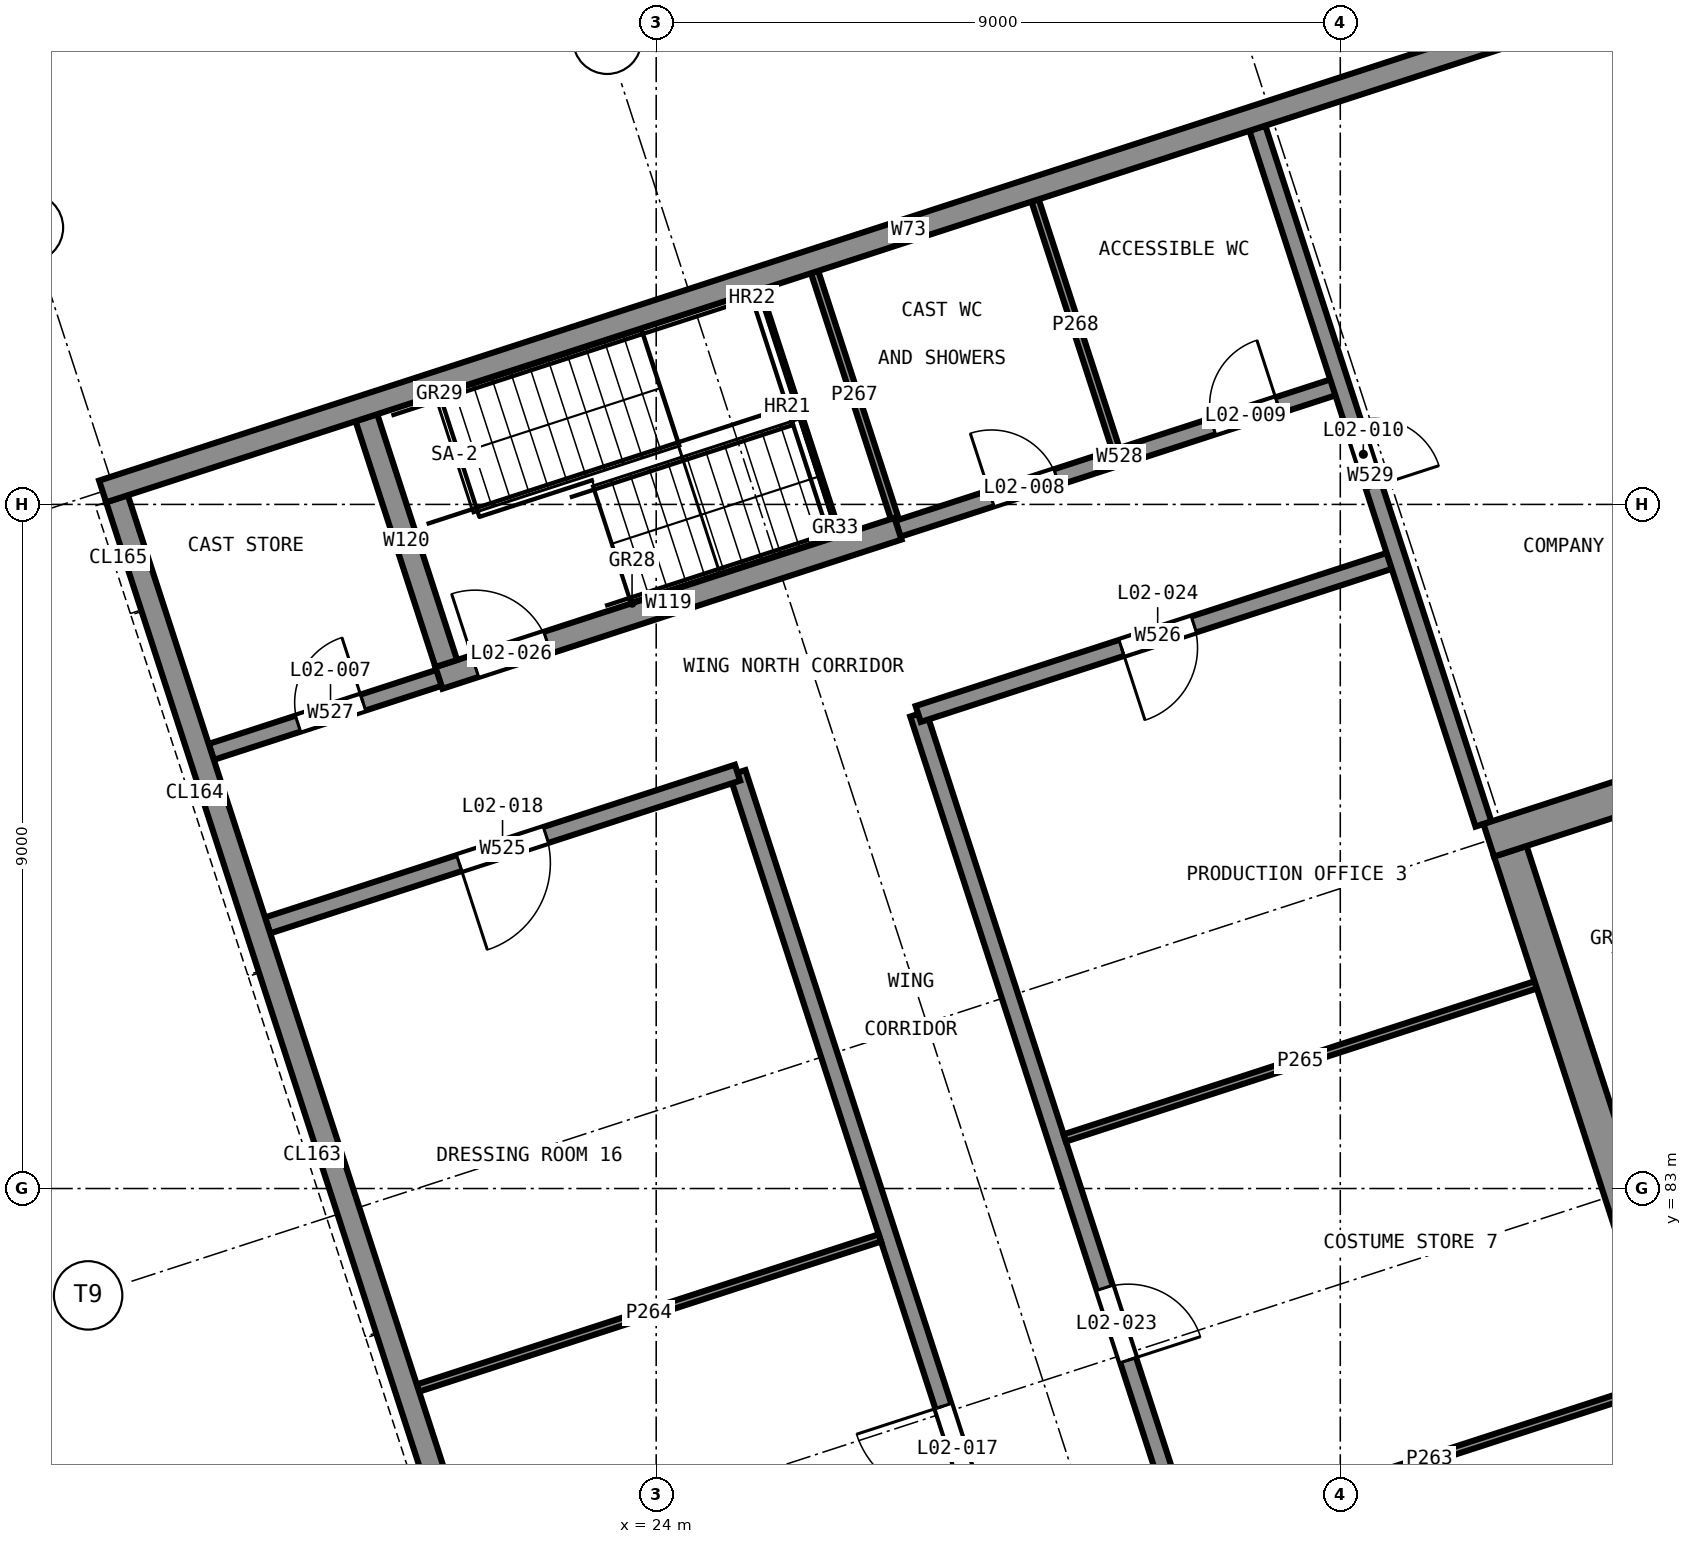
"""IFC4 building model, lengths in metres.
Left out: names, types, materials, properties, quantities, classifications, styles, units other than length and angle.
Written with IfcOpenShell. Run it as: python <this file> out.ifc"""

import sys

from ifc_helpers import new_model, si_unit, direction, frame, frame_2d, origin, place, context, subcontext, project, spatial, rectangle, extrude, element, fill, save


model = new_model("IFC4")
c1 = context("Model", 3, precision=1e-05, world=origin(), true_north=direction((0.0, 1.0)))
c2 = subcontext(c1, "Body", "Model", "MODEL_VIEW")
j1 = project(units=[si_unit("LENGTHUNIT", "METRE"), si_unit("PLANEANGLEUNIT", "RADIAN")], contexts=[c1])
p1 = place(None, origin())
s1 = spatial("IfcSite", under=j1, at=p1, CompositionType="ELEMENT")
p2 = place(p1, origin())
s2 = spatial("IfcBuilding", under=s1, at=p2, CompositionType="ELEMENT")
p3 = place(p2, frame((0.0, 0.0, 9.5)))
s3 = spatial("IfcBuildingStorey", under=s2, at=p3, CompositionType="ELEMENT", Elevation=9.5)
p4 = place(p3, frame((41.286, 68.82, 0.0), z_axis=(0.0, 0.0, 1.0), x_axis=(-0.309008517326, 0.951059270613, 0.0)))
e1 = element("IfcWall", 1, at=p4, inside=s3, PredefinedType="SHEAR", context=c2, shape_type="SweptSolid", body=[
    extrude(rectangle(XDim=19.575, YDim=0.45, at=frame_2d((9.788, 0.0))), origin(), (0.0, 0.0, 1.0), 4.0),
])
p5 = place(p3, frame((34.953, 87.581, 0.0), z_axis=(0.0, 0.0, 1.0), x_axis=(0.951059165148, 0.309008841924, 0.0)))
e2 = element("IfcWall", 2, at=p5, inside=s3, PredefinedType="SHEAR", context=c2, shape_type="SweptSolid", body=[
    extrude(rectangle(XDim=29.45, YDim=0.45, at=frame_2d((14.725, 0.0))), origin(), (0.0, 0.0, 1.0), 4.0),
])
p6 = place(p3, frame((33.501, 41.003, 0.0), z_axis=(0.0, 0.0, 1.0), x_axis=(-0.309017194826, 0.951056451165, 0.0)))
e3 = element("IfcWall", 3, at=p6, inside=s3, PredefinedType="SOLIDWALL", context=c2, shape_type="SweptSolid", body=[
    extrude(rectangle(XDim=53.7, YDim=0.3, at=frame_2d((26.85, 0.0))), origin(), (0.0, 0.0, 1.0), 4.0),
])
p7 = place(p6, frame((21.55, 0.0, 0.9)))
e4 = element("IfcOpeningElement", 4, at=p7, cuts=e3, PredefinedType="OPENING", context=c2, shape_type="SweptSolid", body=[
    extrude(rectangle(XDim=3.6, YDim=2.1, at=frame_2d((1.8, 1.05))), frame((0.0, 0.16, 0.0), z_axis=(0.0, -1.0, 0.0), x_axis=(1.0, 0.0, 0.0)), (0.0, 0.0, 1.0), 0.32),
])
p8 = place(p3, frame((16.718, 92.171, 0.0), z_axis=(0.0, 0.0, 1.0), x_axis=(0.951055789165, 0.309019232243, 0.0)))
e5 = element("IfcWall", 5, at=p8, inside=s3, PredefinedType="SOLIDWALL", context=c2, shape_type="SweptSolid", body=[
    extrude(rectangle(XDim=22.3, YDim=0.3, at=frame_2d((11.15, 0.0))), origin(), (0.0, 0.0, 1.0), 4.0),
])
p9 = place(p3, frame((27.181, 91.68, 0.0), z_axis=(0.0, 0.0, 1.0), x_axis=(-0.951051301895, -0.309033042189, 0.0)))
e6 = element("IfcWall", 6, at=p9, inside=s3, PredefinedType="SOLIDWALL", context=c2, shape_type="SweptSolid", body=[
    extrude(rectangle(XDim=6.35, YDim=0.3, at=frame_2d((3.175, 0.0))), origin(), (0.0, 0.0, 1.0), 3.7),
])
p10 = place(p9, frame((4.85, 0.0, 0.0)))
e7 = element("IfcOpeningElement", 7, at=p10, cuts=e6, PredefinedType="OPENING", context=c2, shape_type="SweptSolid", body=[
    extrude(rectangle(XDim=1.0, YDim=2.1, at=frame_2d((0.5, 1.05))), frame((0.0, 0.16, 0.0), z_axis=(0.0, -1.0, 0.0), x_axis=(1.0, 0.0, 0.0)), (0.0, 0.0, 1.0), 0.32),
])
p11 = place(p3, frame((21.238, 89.907, 0.0), z_axis=(0.0, 0.0, 1.0), x_axis=(-0.309066587596, 0.951040401051, 0.0)))
e8 = element("IfcWall", 8, at=p11, inside=s3, PredefinedType="SOLIDWALL", context=c2, shape_type="SweptSolid", body=[
    extrude(rectangle(XDim=3.4, YDim=0.3, at=frame_2d((1.7, 0.0))), origin(), (0.0, 0.0, 1.0), 3.7),
])
p12 = place(p3, frame((37.956, 48.812, 0.0), z_axis=(0.0, 0.0, 1.0), x_axis=(-0.30901736393, 0.951056396219, 0.0)))
e9 = element("IfcWall", 9, at=p12, inside=s3, PredefinedType="SOLIDWALL", context=c2, shape_type="SweptSolid", body=[
    extrude(rectangle(XDim=41.7, YDim=0.22, at=frame_2d((20.85, 0.0))), origin(), (0.0, 0.0, 1.0), 3.7),
])
p13 = place(p12, frame((2.009, 0.0, 0.0)))
e10 = element("IfcOpeningElement", 10, at=p13, cuts=e9, PredefinedType="OPENING", context=c2, shape_type="SweptSolid", body=[
    extrude(rectangle(XDim=1.0, YDim=2.1, at=frame_2d((0.5, 1.05))), frame((0.0, 0.12, 0.0), z_axis=(0.0, -1.0, 0.0), x_axis=(1.0, 0.0, 0.0)), (0.0, 0.0, 1.0), 0.24),
])
p14 = place(p12, frame((6.6, 0.0, 0.0)))
e11 = element("IfcOpeningElement", 11, at=p14, cuts=e9, PredefinedType="OPENING", context=c2, shape_type="SweptSolid", body=[
    extrude(rectangle(XDim=1.2, YDim=2.1, at=frame_2d((0.6, 1.05))), frame((0.0, 0.12, 0.0), z_axis=(0.0, -1.0, 0.0), x_axis=(1.0, 0.0, 0.0)), (0.0, 0.0, 1.0), 0.24),
])
p15 = place(p12, frame((11.7, 0.0, 0.0)))
e12 = element("IfcOpeningElement", 12, at=p15, cuts=e9, PredefinedType="OPENING", context=c2, shape_type="SweptSolid", body=[
    extrude(rectangle(XDim=1.2, YDim=2.1, at=frame_2d((0.6, 1.05))), frame((0.0, 0.12, 0.0), z_axis=(0.0, -1.0, 0.0), x_axis=(1.0, 0.0, 0.0)), (0.0, 0.0, 1.0), 0.24),
])
p16 = place(p12, frame((16.7, 0.0, 0.0)))
e13 = element("IfcOpeningElement", 13, at=p16, cuts=e9, PredefinedType="OPENING", context=c2, shape_type="SweptSolid", body=[
    extrude(rectangle(XDim=1.2, YDim=2.1, at=frame_2d((0.6, 1.05))), frame((0.0, 0.12, 0.0), z_axis=(0.0, -1.0, 0.0), x_axis=(1.0, 0.0, 0.0)), (0.0, 0.0, 1.0), 0.24),
])
p17 = place(p12, frame((21.7, 0.0, 0.0)))
e14 = element("IfcOpeningElement", 14, at=p17, cuts=e9, PredefinedType="OPENING", context=c2, shape_type="SweptSolid", body=[
    extrude(rectangle(XDim=1.2, YDim=2.1, at=frame_2d((0.6, 1.05))), frame((0.0, 0.12, 0.0), z_axis=(0.0, -1.0, 0.0), x_axis=(1.0, 0.0, 0.0)), (0.0, 0.0, 1.0), 0.24),
])
p18 = place(p12, frame((26.7, 0.0, 0.0)))
e15 = element("IfcOpeningElement", 15, at=p18, cuts=e9, PredefinedType="OPENING", context=c2, shape_type="SweptSolid", body=[
    extrude(rectangle(XDim=1.2, YDim=2.1, at=frame_2d((0.6, 1.05))), frame((0.0, 0.12, 0.0), z_axis=(0.0, -1.0, 0.0), x_axis=(1.0, 0.0, 0.0)), (0.0, 0.0, 1.0), 0.24),
])
p19 = place(p12, frame((31.739, 0.0, 0.0)))
e16 = element("IfcOpeningElement", 16, at=p19, cuts=e9, PredefinedType="OPENING", context=c2, shape_type="SweptSolid", body=[
    extrude(rectangle(XDim=1.2, YDim=2.1, at=frame_2d((0.6, 1.05))), frame((0.0, 0.12, 0.0), z_axis=(0.0, -1.0, 0.0), x_axis=(1.0, 0.0, 0.0)), (0.0, 0.0, 1.0), 0.24),
])
p20 = place(p3, frame((40.333, 49.584, 0.0), z_axis=(0.0, 0.0, 1.0), x_axis=(-0.309015643281, 0.951056955291, 0.0)))
e17 = element("IfcWall", 17, at=p20, inside=s3, PredefinedType="SOLIDWALL", context=c2, shape_type="SweptSolid", body=[
    extrude(rectangle(XDim=41.7, YDim=0.22, at=frame_2d((20.85, 0.0))), origin(), (0.0, 0.0, 1.0), 3.7),
])
p21 = place(p20, frame((1.9, 0.0, 0.0)))
e18 = element("IfcOpeningElement", 18, at=p21, cuts=e17, PredefinedType="OPENING", context=c2, shape_type="SweptSolid", body=[
    extrude(rectangle(XDim=1.2, YDim=2.1, at=frame_2d((0.6, 1.05))), frame((0.0, 0.12, 0.0), z_axis=(0.0, -1.0, 0.0), x_axis=(1.0, 0.0, 0.0)), (0.0, 0.0, 1.0), 0.24),
])
p22 = place(p20, frame((8.285, 0.0, 0.0)))
e19 = element("IfcOpeningElement", 19, at=p22, cuts=e17, PredefinedType="OPENING", context=c2, shape_type="SweptSolid", body=[
    extrude(rectangle(XDim=1.0, YDim=2.1, at=frame_2d((0.5, 1.05))), frame((0.0, 0.12, 0.0), z_axis=(0.0, -1.0, 0.0), x_axis=(1.0, 0.0, 0.0)), (0.0, 0.0, 1.0), 0.24),
])
p23 = place(p20, frame((16.475, 0.0, 0.0)))
e20 = element("IfcOpeningElement", 20, at=p23, cuts=e17, PredefinedType="OPENING", context=c2, shape_type="SweptSolid", body=[
    extrude(rectangle(XDim=1.0, YDim=2.1, at=frame_2d((0.5, 1.05))), frame((0.0, 0.12, 0.0), z_axis=(0.0, -1.0, 0.0), x_axis=(1.0, 0.0, 0.0)), (0.0, 0.0, 1.0), 0.24),
])
p24 = place(p20, frame((25.752, 0.0, 0.0)))
e21 = element("IfcOpeningElement", 21, at=p24, cuts=e17, PredefinedType="OPENING", context=c2, shape_type="SweptSolid", body=[
    extrude(rectangle(XDim=1.0, YDim=2.1, at=frame_2d((0.5, 1.05))), frame((0.0, 0.12, 0.0), z_axis=(0.0, -1.0, 0.0), x_axis=(1.0, 0.0, 0.0)), (0.0, 0.0, 1.0), 0.24),
])
p25 = place(p20, frame((32.761, 0.0, 0.0)))
e22 = element("IfcOpeningElement", 22, at=p25, cuts=e17, PredefinedType="OPENING", context=c2, shape_type="SweptSolid", body=[
    extrude(rectangle(XDim=1.0, YDim=2.1, at=frame_2d((0.5, 1.05))), frame((0.0, 0.12, 0.0), z_axis=(0.0, -1.0, 0.0), x_axis=(1.0, 0.0, 0.0)), (0.0, 0.0, 1.0), 0.24),
])
p26 = place(p3, frame((18.888, 86.462, 0.0), z_axis=(0.0, 0.0, 1.0), x_axis=(0.951059735424, 0.30900708674, 0.0)))
e23 = element("IfcWall", 23, at=p26, inside=s3, PredefinedType="SOLIDWALL", context=c2, shape_type="SweptSolid", body=[
    extrude(rectangle(XDim=6.5, YDim=0.22, at=frame_2d((3.25, 0.0))), origin(), (0.0, 0.0, 1.0), 3.7),
])
p27 = place(p26, frame((2.65, 0.0, 0.0)))
e24 = element("IfcOpeningElement", 24, at=p27, cuts=e23, PredefinedType="OPENING", context=c2, shape_type="SweptSolid", body=[
    extrude(rectangle(XDim=1.2, YDim=2.1, at=frame_2d((0.6, 1.05))), frame((0.0, 0.12, 0.0), z_axis=(0.0, -1.0, 0.0), x_axis=(1.0, 0.0, 0.0)), (0.0, 0.0, 1.0), 0.24),
])
p28 = place(p3, frame((27.447, 89.243, 0.0), z_axis=(0.0, 0.0, 1.0), x_axis=(0.951062229373, 0.308999410776, 0.0)))
e25 = element("IfcWall", 25, at=p28, inside=s3, PredefinedType="SOLIDWALL", context=c2, shape_type="SweptSolid", body=[
    extrude(rectangle(XDim=6.625, YDim=0.22, at=frame_2d((3.312, 0.0))), origin(), (0.0, 0.0, 1.0), 3.7),
])
p29 = place(p28, frame((2.812, 0.0, 0.0)))
e26 = element("IfcOpeningElement", 26, at=p29, cuts=e25, PredefinedType="OPENING", context=c2, shape_type="SweptSolid", body=[
    extrude(rectangle(XDim=1.0, YDim=2.1, at=frame_2d((0.5, 1.05))), frame((0.0, 0.12, 0.0), z_axis=(0.0, -1.0, 0.0), x_axis=(1.0, 0.0, 0.0)), (0.0, 0.0, 1.0), 0.24),
])
p30 = place(p3, frame((18.146, 88.744, 0.0), z_axis=(0.0, 0.0, 1.0), x_axis=(0.951053095941, 0.309027520945, 0.0)))
e27 = element("IfcWall", 27, at=p30, inside=s3, PredefinedType="SOLIDWALL", context=c2, shape_type="SweptSolid", body=[
    extrude(rectangle(XDim=3.3, YDim=0.22, at=frame_2d((1.65, 0.0))), origin(), (0.0, 0.0, 1.0), 3.7),
])
p31 = place(p30, frame((1.2, 0.0, 0.0)))
e28 = element("IfcOpeningElement", 28, at=p31, cuts=e27, PredefinedType="OPENING", context=c2, shape_type="SweptSolid", body=[
    extrude(rectangle(XDim=0.9, YDim=2.1, at=frame_2d((0.45, 1.05))), frame((0.0, 0.12, 0.0), z_axis=(0.0, -1.0, 0.0), x_axis=(1.0, 0.0, 0.0)), (0.0, 0.0, 1.0), 0.24),
])
p32 = place(p3, frame((27.181, 91.68, 0.0), z_axis=(0.0, 0.0, 1.0), x_axis=(0.951063356831, 0.308995940577, 0.0)))
e29 = element("IfcWall", 29, at=p32, inside=s3, PredefinedType="SOLIDWALL", context=c2, shape_type="SweptSolid", body=[
    extrude(rectangle(XDim=6.125, YDim=0.22, at=frame_2d((3.062, 0.0))), origin(), (0.0, 0.0, 1.0), 3.7),
])
p33 = place(p32, frame((1.293, 0.0, 0.0)))
e30 = element("IfcOpeningElement", 30, at=p33, cuts=e29, PredefinedType="OPENING", context=c2, shape_type="SweptSolid", body=[
    extrude(rectangle(XDim=0.9, YDim=2.1, at=frame_2d((0.45, 1.05))), frame((0.0, 0.12, 0.0), z_axis=(0.0, -1.0, 0.0), x_axis=(1.0, 0.0, 0.0)), (0.0, 0.0, 1.0), 0.24),
])
p34 = place(p32, frame((4.357, 0.0, 0.0)))
e31 = element("IfcOpeningElement", 31, at=p34, cuts=e29, PredefinedType="OPENING", context=c2, shape_type="SweptSolid", body=[
    extrude(rectangle(XDim=0.9, YDim=2.1, at=frame_2d((0.45, 1.05))), frame((0.0, 0.12, 0.0), z_axis=(0.0, -1.0, 0.0), x_axis=(1.0, 0.0, 0.0)), (0.0, 0.0, 1.0), 0.24),
])
p35 = place(p3, frame((34.884, 87.795, 0.0), z_axis=(0.0, 0.0, 1.0), x_axis=(-0.309027569133, 0.951053080283, 0.0)))
e32 = element("IfcWall", 32, at=p35, inside=s3, PredefinedType="SOLIDWALL", context=c2, shape_type="SweptSolid", body=[
    extrude(rectangle(XDim=9.625, YDim=0.22, at=frame_2d((4.812, 0.0))), origin(), (0.0, 0.0, 1.0), 3.7),
])
p36 = place(p35, frame((4.665, 0.0, 0.0)))
e33 = element("IfcOpeningElement", 33, at=p36, cuts=e32, PredefinedType="OPENING", context=c2, shape_type="SweptSolid", body=[
    extrude(rectangle(XDim=0.9, YDim=2.1, at=frame_2d((0.45, 1.05))), frame((0.0, 0.12, 0.0), z_axis=(0.0, -1.0, 0.0), x_axis=(1.0, 0.0, 0.0)), (0.0, 0.0, 1.0), 0.24),
])
p37 = place(p3, frame((31.075, 78.435, 0.0), z_axis=(0.0, 0.0, 1.0), x_axis=(0.951058024796, 0.309012351648, 0.0)))
e34 = element("IfcWall", 34, at=p37, inside=s3, PredefinedType="PARTITIONING", context=c2, shape_type="SweptSolid", body=[
    extrude(rectangle(XDim=6.515, YDim=0.1, at=frame_2d((3.257, 0.0))), origin(), (0.0, 0.0, 1.0), 3.7),
])
p38 = place(p3, frame((20.865, 80.375, 0.0), z_axis=(0.0, 0.0, 1.0), x_axis=(0.951055405517, 0.309020412977, 0.0)))
e35 = element("IfcWall", 35, at=p38, inside=s3, PredefinedType="PARTITIONING", context=c2, shape_type="SweptSolid", body=[
    extrude(rectangle(XDim=6.39, YDim=0.1, at=frame_2d((3.195, 0.0))), origin(), (0.0, 0.0, 1.0), 3.7),
])
p39 = place(p3, frame((29.375, 83.666, 0.0), z_axis=(0.0, 0.0, 1.0), x_axis=(0.951061602966, 0.309001338773, 0.0)))
e36 = element("IfcWall", 36, at=p39, inside=s3, PredefinedType="PARTITIONING", context=c2, shape_type="SweptSolid", body=[
    extrude(rectangle(XDim=6.515, YDim=0.1, at=frame_2d((3.258, 0.0))), origin(), (0.0, 0.0, 1.0), 3.7),
])
p40 = place(p3, frame((27.135, 91.823, 0.0), z_axis=(0.0, 0.0, 1.0), x_axis=(-0.308980533303, 0.951068362443, 0.0)))
e37 = element("IfcWall", 37, at=p40, inside=s3, PredefinedType="PARTITIONING", context=c2, shape_type="SweptSolid", body=[
    extrude(rectangle(XDim=3.4, YDim=0.1, at=frame_2d((1.7, 0.0))), origin(), (0.0, 0.0, 1.0), 3.7),
])
p41 = place(p3, frame((30.048, 92.727, 0.0), z_axis=(0.0, 0.0, 1.0), x_axis=(-0.309021877853, 0.951054929543, 0.0)))
e38 = element("IfcWall", 38, at=p41, inside=s3, PredefinedType="PARTITIONING", context=c2, shape_type="SweptSolid", body=[
    extrude(rectangle(XDim=3.44, YDim=0.1, at=frame_2d((1.72, 0.0))), origin(), (0.0, 0.0, 1.0), 3.7),
])
p42 = place(p31, origin())
e39 = element("IfcDoor", 39, at=p42, inside=s3, OperationType="SINGLE_SWING_LEFT", PredefinedType="DOOR", context=c2, shape_type="SweptSolid", body=[
    extrude(rectangle(XDim=0.9, YDim=2.1, at=frame_2d((0.45, 1.05))), frame((0.0, 0.025, 0.0), z_axis=(0.0, -1.0, 0.0), x_axis=(1.0, 0.0, 0.0)), (0.0, 0.0, 1.0), 0.05),
])
fill(e28, e39)
p43 = place(p33, origin())
e40 = element("IfcDoor", 40, at=p43, inside=s3, OperationType="SINGLE_SWING_RIGHT", PredefinedType="DOOR", context=c2, shape_type="SweptSolid", body=[
    extrude(rectangle(XDim=0.9, YDim=2.1, at=frame_2d((0.45, 1.05))), frame((0.0, 0.025, 0.0), z_axis=(0.0, -1.0, 0.0), x_axis=(1.0, 0.0, 0.0)), (0.0, 0.0, 1.0), 0.05),
])
fill(e30, e40)
p44 = place(p34, origin())
e41 = element("IfcDoor", 41, at=p44, inside=s3, OperationType="SINGLE_SWING_LEFT", PredefinedType="DOOR", context=c2, shape_type="SweptSolid", body=[
    extrude(rectangle(XDim=0.9, YDim=2.1, at=frame_2d((0.45, 1.05))), frame((0.0, 0.025, 0.0), z_axis=(0.0, -1.0, 0.0), x_axis=(1.0, 0.0, 0.0)), (0.0, 0.0, 1.0), 0.05),
])
fill(e31, e41)
p45 = place(p36, frame((0.9, 0.0, 0.0), z_axis=(0.0, 0.0, 1.0), x_axis=(-1.0, 0.0, 0.0)))
e42 = element("IfcDoor", 42, at=p45, inside=s3, OperationType="SINGLE_SWING_LEFT", PredefinedType="DOOR", context=c2, shape_type="SweptSolid", body=[
    extrude(rectangle(XDim=0.9, YDim=2.1, at=frame_2d((0.45, 1.05))), frame((0.0, 0.025, 0.0), z_axis=(0.0, -1.0, 0.0), x_axis=(1.0, 0.0, 0.0)), (0.0, 0.0, 1.0), 0.05),
])
fill(e33, e42)
p46 = place(p19, origin())
e43 = element("IfcDoor", 43, at=p46, inside=s3, OperationType="SINGLE_SWING_LEFT", PredefinedType="DOOR", context=c2, shape_type="SweptSolid", body=[
    extrude(rectangle(XDim=1.2, YDim=2.1, at=frame_2d((0.6, 1.05))), frame((0.0, 0.025, 0.0), z_axis=(0.0, -1.0, 0.0), x_axis=(1.0, 0.0, 0.0)), (0.0, 0.0, 1.0), 0.05),
])
fill(e16, e43)
p47 = place(p27, frame((1.2, 0.0, 0.0), z_axis=(0.0, 0.0, 1.0), x_axis=(-1.0, 0.0, 0.0)))
e44 = element("IfcDoor", 44, at=p47, inside=s3, OperationType="SINGLE_SWING_LEFT", PredefinedType="DOOR", context=c2, shape_type="SweptSolid", body=[
    extrude(rectangle(XDim=1.2, YDim=2.1, at=frame_2d((0.6, 1.05))), frame((0.0, 0.025, 0.0), z_axis=(0.0, -1.0, 0.0), x_axis=(1.0, 0.0, 0.0)), (0.0, 0.0, 1.0), 0.05),
])
fill(e24, e44)
p48 = place(p25, frame((1.0, 0.0, 0.0), z_axis=(0.0, 0.0, 1.0), x_axis=(-1.0, 0.0, 0.0)))
e45 = element("IfcDoor", 45, at=p48, inside=s3, OperationType="SINGLE_SWING_LEFT", PredefinedType="DOOR", context=c2, shape_type="SweptSolid", body=[
    extrude(rectangle(XDim=1.0, YDim=2.1, at=frame_2d((0.5, 1.05))), frame((0.0, 0.025, 0.0), z_axis=(0.0, -1.0, 0.0), x_axis=(1.0, 0.0, 0.0)), (0.0, 0.0, 1.0), 0.05),
])
fill(e22, e45)
p49 = place(p29, frame((1.0, 0.0, 0.0), z_axis=(0.0, 0.0, 1.0), x_axis=(-1.0, 0.0, 0.0)))
e46 = element("IfcDoor", 46, at=p49, inside=s3, OperationType="SINGLE_SWING_LEFT", PredefinedType="DOOR", context=c2, shape_type="SweptSolid", body=[
    extrude(rectangle(XDim=1.0, YDim=2.1, at=frame_2d((0.5, 1.05))), frame((0.0, 0.025, 0.0), z_axis=(0.0, -1.0, 0.0), x_axis=(1.0, 0.0, 0.0)), (0.0, 0.0, 1.0), 0.05),
])
fill(e26, e46)
p50 = place(p10, frame((1.0, 0.0, 0.0), z_axis=(0.0, 0.0, 1.0), x_axis=(-1.0, 0.0, 0.0)))
e47 = element("IfcDoor", 47, at=p50, inside=s3, OperationType="SINGLE_SWING_RIGHT", PredefinedType="DOOR", context=c2, shape_type="SweptSolid", body=[
    extrude(rectangle(XDim=1.0, YDim=2.1, at=frame_2d((0.5, 1.05))), frame((0.0, 0.025, 0.0), z_axis=(0.0, -1.0, 0.0), x_axis=(1.0, 0.0, 0.0)), (0.0, 0.0, 1.0), 0.05),
])
fill(e7, e47)
save(model, sys.argv[1])
